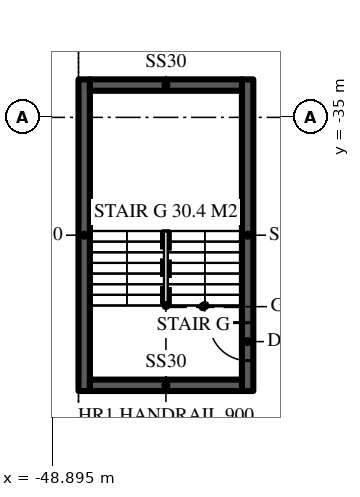
"""IFC4 building model, lengths in metres.
Left out: names, types, materials, properties, quantities, classifications, styles, units other than length and angle.
Written with IfcOpenShell. Run it as: python <this file> out.ifc"""

import sys

from ifc_helpers import new_model, si_unit, direction, frame, frame_2d, origin, place, context, subcontext, project, spatial, rectangle, extrude, element, fill, save


model = new_model("IFC4")
c1 = context("Model", 3, precision=1e-05, world=origin(), true_north=direction((0.0, 1.0)))
c2 = subcontext(c1, "Body", "Model", "MODEL_VIEW")
j1 = project(units=[si_unit("LENGTHUNIT", "METRE"), si_unit("PLANEANGLEUNIT", "RADIAN")], contexts=[c1])
p1 = place(None, origin())
s1 = spatial("IfcSite", under=j1, at=p1, CompositionType="ELEMENT")
p2 = place(p1, origin())
s2 = spatial("IfcBuilding", under=s1, at=p2, CompositionType="ELEMENT")
p3 = place(p2, frame((0.0, 0.0, -10.0)))
s3 = spatial("IfcBuildingStorey", under=s2, at=p3, CompositionType="ELEMENT", Elevation=-10.0)
p4 = place(p3, frame((-48.5, 48.2, -0.5), z_axis=(0.0, 0.0, 1.0), x_axis=(0.0, -1.0, 0.0)))
e1 = element("IfcWall", 1, at=p4, inside=s3, PredefinedType="SOLIDWALL", context=c2, shape_type="SweptSolid", body=[
    extrude(rectangle(XDim=96.4, YDim=0.6, at=frame_2d((48.2, 0.0))), origin(), (0.0, 0.0, 1.0), 10.1),
])
p5 = place(p2, frame((0.0, 0.0, -5.0)))
s4 = spatial("IfcBuildingStorey", under=s2, at=p5, CompositionType="ELEMENT", Elevation=-5.0)
p6 = place(p5, frame((-43.75, -42.2, 0.0), z_axis=(0.0, 0.0, 1.0), x_axis=(0.0, 1.0, 0.0)))
e2 = element("IfcWall", 2, at=p6, inside=s4, PredefinedType="SOLIDWALL", context=c2, shape_type="SweptSolid", body=[
    extrude(rectangle(XDim=8.2, YDim=0.3, at=frame_2d((4.1, 0.0))), origin(), (0.0, 0.0, 1.0), 4.6),
])
p7 = place(p6, frame((0.8, 0.0, 0.0)))
e3 = element("IfcOpeningElement", 3, at=p7, cuts=e2, PredefinedType="OPENING", context=c2, shape_type="SweptSolid", body=[
    extrude(rectangle(XDim=1.0, YDim=2.2, at=frame_2d((0.5, 1.1))), frame((0.0, 0.16, 0.0), z_axis=(0.0, -1.0, 0.0), x_axis=(1.0, 0.0, 0.0)), (0.0, 0.0, 1.0), 0.32),
])
p8 = place(p5, frame((-48.05, -34.0, 0.0), z_axis=(0.0, 0.0, 1.0), x_axis=(0.0, -1.0, 0.0)))
e4 = element("IfcWall", 4, at=p8, inside=s4, PredefinedType="SOLIDWALL", context=c2, shape_type="SweptSolid", body=[
    extrude(rectangle(XDim=8.2, YDim=0.3, at=frame_2d((4.1, 0.0))), origin(), (0.0, 0.0, 1.0), 4.6),
])
for number, where, z_axis, x_axis in (
    (5, (-43.9, -42.05, 0.0), (0.0, 0.0, 1.0), (-1.0, 0.0, 0.0)),
    (6, (-47.9, -34.15, 0.0), (0.0, 0.0, 1.0), (1.0, 0.0, 0.0)),
):
    element("IfcWall", number, at=place(p5, frame(where, z_axis=z_axis, x_axis=x_axis)), inside=s4, PredefinedType="SOLIDWALL", context=c2, shape_type="SweptSolid", body=[
        extrude(rectangle(XDim=4.0, YDim=0.3, at=frame_2d((2.0, 0.0))), origin(), (0.0, 0.0, 1.0), 4.6),
    ])
p9 = place(p7, origin())
e7 = element("IfcDoor", 7, at=p9, inside=s4, OperationType="SINGLE_SWING_RIGHT", PredefinedType="DOOR", context=c2, shape_type="SweptSolid", body=[
    extrude(rectangle(XDim=1.0, YDim=2.2, at=frame_2d((0.5, 1.1))), frame((0.0, 0.025, 0.0), z_axis=(0.0, -1.0, 0.0), x_axis=(1.0, 0.0, 0.0)), (0.0, 0.0, 1.0), 0.05),
])
fill(e3, e7)
save(model, sys.argv[1])
